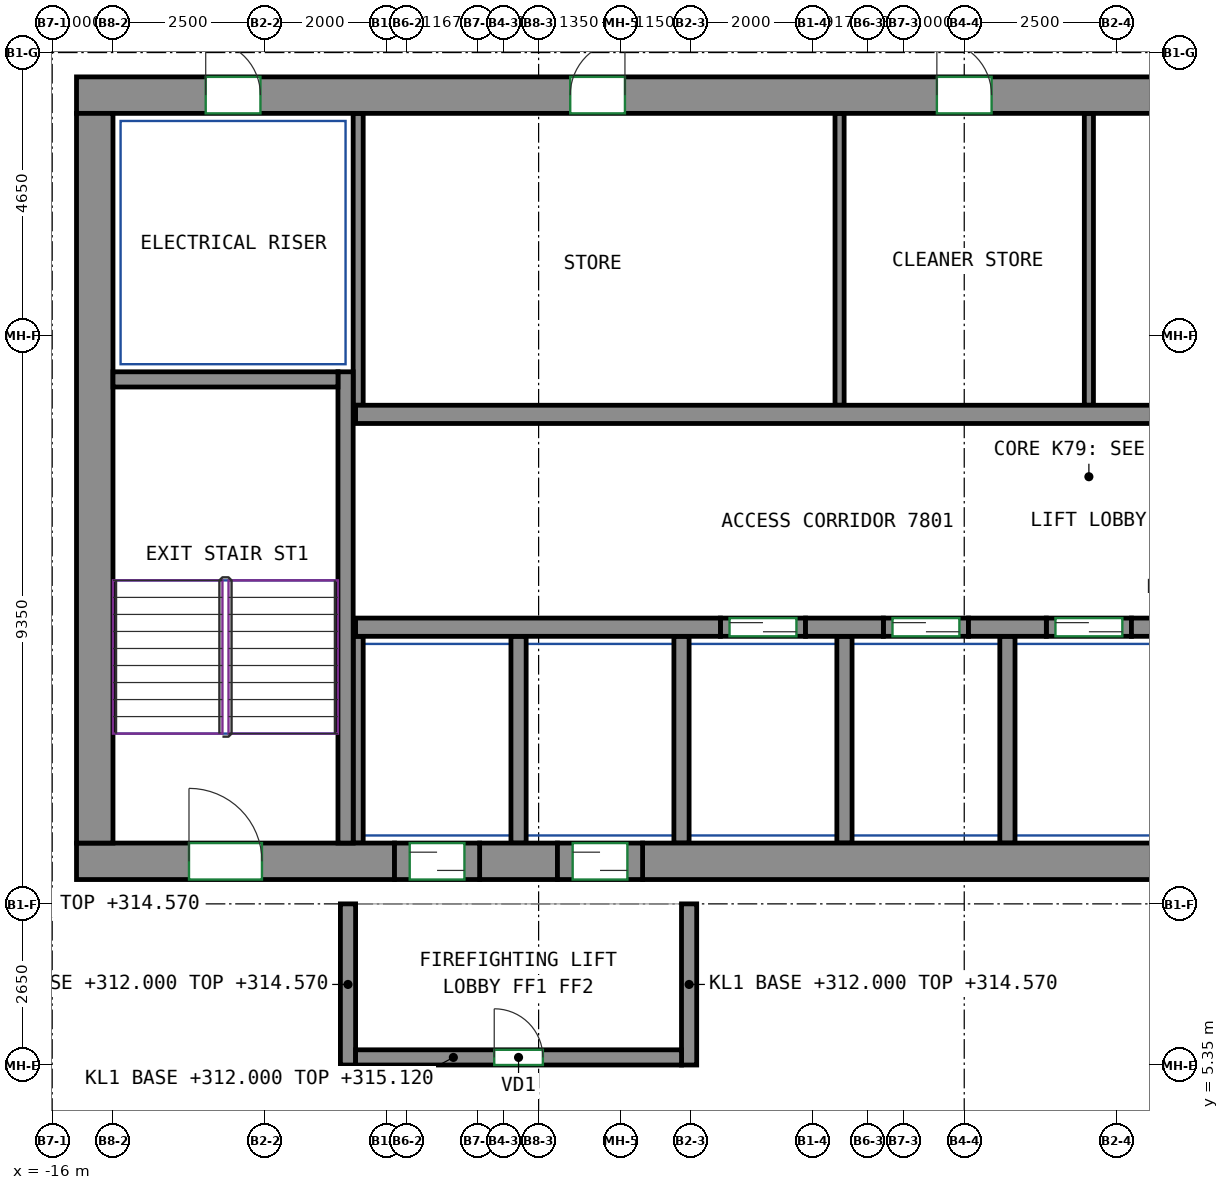
"""IFC4 building model, lengths in metres.
Left out: names, types, materials, properties, quantities, classifications, styles, units other than length and angle.
Written with IfcOpenShell. Run it as: python <this file> out.ifc"""

import sys

from ifc_helpers import new_model, si_unit, direction, frame, frame_2d, origin, place, context, subcontext, project, spatial, rectangle, extrude, source, transform, mapped, element, fill, save


model = new_model("IFC4")
c1 = context("Model", 3, precision=1e-05, world=origin(), true_north=direction((0.0, 1.0)))
c2 = subcontext(c1, "Body", "Model", "MODEL_VIEW")
j1 = project(units=[si_unit("LENGTHUNIT", "METRE"), si_unit("PLANEANGLEUNIT", "RADIAN")], contexts=[c1])
p1 = place(None, origin())
s1 = spatial("IfcSite", under=j1, at=p1, CompositionType="ELEMENT")
p2 = place(p1, origin())
s2 = spatial("IfcBuilding", under=s1, at=p2, CompositionType="ELEMENT")
p3 = place(p2, frame((0.0, 0.0, 312.0)))
s3 = spatial("IfcBuildingStorey", under=s2, at=p3, CompositionType="ELEMENT", Elevation=312.0)
m1 = source(origin(), c2, "Body", "SweptSolid", [
    extrude(rectangle(XDim=5.23, YDim=0.6, at=frame_2d((2.615, 0.0))), origin(), (0.0, 0.0, 1.0), 3.12),
])
p4 = place(p3, frame((-15.6, 8.7, 0.0), z_axis=(0.0, 0.0, 1.0), x_axis=(1.0, 0.0, 0.0)))
e1 = element("IfcWall", 1, at=p4, inside=s3, PredefinedType="SHEAR", context=c2, shape_type="MappedRepresentation", body=[
    mapped(m1, transform((0.0, 0.0, 0.0))),
])
p5 = place(p4, frame((1.85, 0.0, 0.0)))
e2 = element("IfcOpeningElement", 2, at=p5, cuts=e1, PredefinedType="OPENING", context=c2, shape_type="SweptSolid", body=[
    extrude(rectangle(XDim=1.2, YDim=2.1, at=frame_2d((0.6, 1.05))), frame((0.0, 0.31, 0.0), z_axis=(0.0, -1.0, 0.0), x_axis=(1.0, 0.0, 0.0)), (0.0, 0.0, 1.0), 0.62),
])
m2 = source(origin(), c2, "Body", "SweptSolid", [
    extrude(rectangle(XDim=1.28, YDim=0.6, at=frame_2d((0.64, 0.0))), origin(), (0.0, 0.0, 1.0), 3.12),
])
p6 = place(p3, frame((-8.97, 8.7, 0.0), z_axis=(0.0, 0.0, 1.0), x_axis=(1.0, 0.0, 0.0)))
e3 = element("IfcWall", 3, at=p6, inside=s3, PredefinedType="SHEAR", context=c2, shape_type="MappedRepresentation", body=[
    mapped(m2, transform((0.0, 0.0, 0.0))),
])
m3 = source(origin(), c2, "Body", "SweptSolid", [
    extrude(rectangle(XDim=14.18, YDim=0.6, at=frame_2d((7.09, 0.0))), origin(), (0.0, 0.0, 1.0), 3.12),
])
p7 = place(p3, frame((-6.29, 8.7, 0.0), z_axis=(0.0, 0.0, 1.0), x_axis=(1.0, 0.0, 0.0)))
e4 = element("IfcWall", 4, at=p7, inside=s3, PredefinedType="SHEAR", context=c2, shape_type="MappedRepresentation", body=[
    mapped(m3, transform((0.0, 0.0, 0.0))),
])
m4 = source(origin(), c2, "Body", "SweptSolid", [
    extrude(rectangle(XDim=33.3, YDim=0.6, at=frame_2d((16.65, 0.0))), origin(), (0.0, 0.0, 1.0), 3.12),
])
p8 = place(p3, frame((-15.6, 21.3, 0.0), z_axis=(0.0, 0.0, 1.0), x_axis=(1.0, 0.0, 0.0)))
e5 = element("IfcWall", 5, at=p8, inside=s3, PredefinedType="SHEAR", context=c2, shape_type="MappedRepresentation", body=[
    mapped(m4, transform((0.0, 0.0, 0.0))),
])
p9 = place(p8, frame((8.12, 0.0, 0.0)))
e6 = element("IfcOpeningElement", 6, at=p9, cuts=e5, PredefinedType="OPENING", context=c2, shape_type="SweptSolid", body=[
    extrude(rectangle(XDim=0.9, YDim=2.1, at=frame_2d((0.45, 1.05))), frame((0.0, 0.31, 0.0), z_axis=(0.0, -1.0, 0.0), x_axis=(1.0, 0.0, 0.0)), (0.0, 0.0, 1.0), 0.62),
])
p10 = place(p8, frame((14.15, 0.0, 0.0)))
e7 = element("IfcOpeningElement", 7, at=p10, cuts=e5, PredefinedType="OPENING", context=c2, shape_type="SweptSolid", body=[
    extrude(rectangle(XDim=0.9, YDim=2.1, at=frame_2d((0.45, 1.05))), frame((0.0, 0.31, 0.0), z_axis=(0.0, -1.0, 0.0), x_axis=(1.0, 0.0, 0.0)), (0.0, 0.0, 1.0), 0.62),
])
p11 = place(p8, frame((18.974, 0.0, 0.0)))
e8 = element("IfcOpeningElement", 8, at=p11, cuts=e5, PredefinedType="OPENING", context=c2, shape_type="SweptSolid", body=[
    extrude(rectangle(XDim=0.9, YDim=2.1, at=frame_2d((0.45, 1.05))), frame((0.0, 0.31, 0.0), z_axis=(0.0, -1.0, 0.0), x_axis=(1.0, 0.0, 0.0)), (0.0, 0.0, 1.0), 0.62),
])
p12 = place(p8, frame((23.664, 0.0, 0.0)))
e9 = element("IfcOpeningElement", 9, at=p12, cuts=e5, PredefinedType="OPENING", context=c2, shape_type="SweptSolid", body=[
    extrude(rectangle(XDim=0.9, YDim=2.1, at=frame_2d((0.45, 1.05))), frame((0.0, 0.31, 0.0), z_axis=(0.0, -1.0, 0.0), x_axis=(1.0, 0.0, 0.0)), (0.0, 0.0, 1.0), 0.62),
])
p13 = place(p8, frame((26.92, 0.0, 0.0)))
e10 = element("IfcOpeningElement", 10, at=p13, cuts=e5, PredefinedType="OPENING", context=c2, shape_type="SweptSolid", body=[
    extrude(rectangle(XDim=0.9, YDim=2.1, at=frame_2d((0.45, 1.05))), frame((0.0, 0.31, 0.0), z_axis=(0.0, -1.0, 0.0), x_axis=(1.0, 0.0, 0.0)), (0.0, 0.0, 1.0), 0.62),
])
p14 = place(p8, frame((2.125, 0.0, 0.0)))
e11 = element("IfcOpeningElement", 11, at=p14, cuts=e5, PredefinedType="OPENING", context=c2, shape_type="SweptSolid", body=[
    extrude(rectangle(XDim=0.9, YDim=2.1, at=frame_2d((0.45, 1.05))), frame((0.0, 0.31, 0.0), z_axis=(0.0, -1.0, 0.0), x_axis=(1.0, 0.0, 0.0)), (0.0, 0.0, 1.0), 0.62),
])
p15 = place(p8, frame((30.275, 0.0, 0.0)))
e12 = element("IfcOpeningElement", 12, at=p15, cuts=e5, PredefinedType="OPENING", context=c2, shape_type="SweptSolid", body=[
    extrude(rectangle(XDim=0.9, YDim=2.1, at=frame_2d((0.45, 1.05))), frame((0.0, 0.31, 0.0), z_axis=(0.0, -1.0, 0.0), x_axis=(1.0, 0.0, 0.0)), (0.0, 0.0, 1.0), 0.62),
])
m5 = source(origin(), c2, "Body", "SweptSolid", [
    extrude(rectangle(XDim=12.0, YDim=0.6, at=frame_2d((6.0, 0.0))), origin(), (0.0, 0.0, 1.0), 3.12),
])
p16 = place(p3, frame((-15.3, 9.0, 0.0), z_axis=(0.0, 0.0, 1.0), x_axis=(0.0, 1.0, 0.0)))
e13 = element("IfcWall", 13, at=p16, inside=s3, PredefinedType="SHEAR", context=c2, shape_type="MappedRepresentation", body=[
    mapped(m5, transform((0.0, 0.0, 0.0))),
])
m6 = source(origin(), c2, "Body", "SweptSolid", [
    extrude(rectangle(XDim=7.75, YDim=0.25, at=frame_2d((3.875, 0.0))), origin(), (0.0, 0.0, 1.0), 3.12),
])
p17 = place(p3, frame((-11.175, 9.0, 0.0), z_axis=(0.0, 0.0, 1.0), x_axis=(0.0, 1.0, 0.0)))
e14 = element("IfcWall", 14, at=p17, inside=s3, PredefinedType="SHEAR", context=c2, shape_type="MappedRepresentation", body=[
    mapped(m6, transform((0.0, 0.0, 0.0))),
])
m7 = source(origin(), c2, "Body", "SweptSolid", [
    extrude(rectangle(XDim=3.7, YDim=0.25, at=frame_2d((1.85, 0.0))), origin(), (0.0, 0.0, 1.0), 3.12),
])
p18 = place(p3, frame((-15.0, 16.625, 0.0), z_axis=(0.0, 0.0, 1.0), x_axis=(1.0, 0.0, 0.0)))
e15 = element("IfcWall", 15, at=p18, inside=s3, PredefinedType="SHEAR", context=c2, shape_type="MappedRepresentation", body=[
    mapped(m7, transform((0.0, 0.0, 0.0))),
])
m8 = source(origin(), c2, "Body", "SweptSolid", [
    extrude(rectangle(XDim=6.0, YDim=0.3, at=frame_2d((3.0, 0.0))), origin(), (0.0, 0.0, 1.0), 3.12),
])
p19 = place(p3, frame((-11.01, 12.55, 0.0), z_axis=(0.0, 0.0, 1.0), x_axis=(1.0, 0.0, 0.0)))
e16 = element("IfcWall", 16, at=p19, inside=s3, PredefinedType="SHEAR", context=c2, shape_type="MappedRepresentation", body=[
    mapped(m8, transform((0.0, 0.0, 0.0))),
])
m9 = source(origin(), c2, "Body", "SweptSolid", [
    extrude(rectangle(XDim=1.28, YDim=0.3, at=frame_2d((0.64, 0.0))), origin(), (0.0, 0.0, 1.0), 3.12),
])
for number, where, z_axis, x_axis in (
    (17, (-3.61, 12.55, 0.0), (0.0, 0.0, 1.0), (1.0, 0.0, 0.0)),
    (18, (-0.93, 12.55, 0.0), (0.0, 0.0, 1.0), (1.0, 0.0, 0.0)),
    (19, (1.75, 12.55, 0.0), (0.0, 0.0, 1.0), (1.0, 0.0, 0.0)),
):
    element("IfcWall", number, at=place(p3, frame(where, z_axis=z_axis, x_axis=x_axis)), inside=s3, PredefinedType="SHEAR", context=c2, shape_type="MappedRepresentation", body=[
        mapped(m9, transform((0.0, 0.0, 0.0))),
    ])
m10 = source(origin(), c2, "Body", "SweptSolid", [
    extrude(rectangle(XDim=22.08, YDim=0.3, at=frame_2d((11.04, 0.0))), origin(), (0.0, 0.0, 1.0), 3.12),
])
p20 = place(p3, frame((-11.01, 16.05, 0.0), z_axis=(0.0, 0.0, 1.0), x_axis=(1.0, 0.0, 0.0)))
e20 = element("IfcWall", 20, at=p20, inside=s3, PredefinedType="SHEAR", context=c2, shape_type="MappedRepresentation", body=[
    mapped(m10, transform((0.0, 0.0, 0.0))),
])
m11 = source(origin(), c2, "Body", "SweptSolid", [
    extrude(rectangle(XDim=1.4, YDim=0.3, at=frame_2d((0.7, 0.0))), origin(), (0.0, 0.0, 1.0), 3.12),
])
p21 = place(p3, frame((-5.01, 12.55, 0.0), z_axis=(0.0, 0.0, 1.0), x_axis=(1.0, 0.0, 0.0)))
e21 = element("IfcWall", 21, at=p21, inside=s3, PredefinedType="PARTITIONING", context=c2, shape_type="MappedRepresentation", body=[
    mapped(m11, transform((0.0, 0.0, 0.0))),
])
p22 = place(p21, frame((0.15, 0.0, 0.0)))
e22 = element("IfcOpeningElement", 22, at=p22, cuts=e21, PredefinedType="OPENING", context=c2, shape_type="SweptSolid", body=[
    extrude(rectangle(XDim=1.1, YDim=2.1, at=frame_2d((0.55, 1.05))), frame((0.0, 0.16, 0.0), z_axis=(0.0, -1.0, 0.0), x_axis=(1.0, 0.0, 0.0)), (0.0, 0.0, 1.0), 0.32),
])
m12 = source(origin(), c2, "Body", "SweptSolid", [
    extrude(rectangle(XDim=1.4, YDim=0.3, at=frame_2d((0.7, 0.0))), origin(), (0.0, 0.0, 1.0), 3.12),
])
p23 = place(p3, frame((-2.33, 12.55, 0.0), z_axis=(0.0, 0.0, 1.0), x_axis=(1.0, 0.0, 0.0)))
e23 = element("IfcWall", 23, at=p23, inside=s3, PredefinedType="PARTITIONING", context=c2, shape_type="MappedRepresentation", body=[
    mapped(m12, transform((0.0, 0.0, 0.0))),
])
p24 = place(p23, frame((0.15, 0.0, 0.0)))
e24 = element("IfcOpeningElement", 24, at=p24, cuts=e23, PredefinedType="OPENING", context=c2, shape_type="SweptSolid", body=[
    extrude(rectangle(XDim=1.1, YDim=2.1, at=frame_2d((0.55, 1.05))), frame((0.0, 0.16, 0.0), z_axis=(0.0, -1.0, 0.0), x_axis=(1.0, 0.0, 0.0)), (0.0, 0.0, 1.0), 0.32),
])
p25 = place(p3, frame((0.35, 12.55, 0.0), z_axis=(0.0, 0.0, 1.0), x_axis=(1.0, 0.0, 0.0)))
e25 = element("IfcWall", 25, at=p25, inside=s3, PredefinedType="PARTITIONING", context=c2, shape_type="MappedRepresentation", body=[
    mapped(m11, transform((0.0, 0.0, 0.0))),
])
p26 = place(p25, frame((0.15, 0.0, 0.0)))
e26 = element("IfcOpeningElement", 26, at=p26, cuts=e25, PredefinedType="OPENING", context=c2, shape_type="SweptSolid", body=[
    extrude(rectangle(XDim=1.1, YDim=2.1, at=frame_2d((0.55, 1.05))), frame((0.0, 0.16, 0.0), z_axis=(0.0, -1.0, 0.0), x_axis=(1.0, 0.0, 0.0)), (0.0, 0.0, 1.0), 0.32),
])
m13 = source(origin(), c2, "Body", "SweptSolid", [
    extrude(rectangle(XDim=2.65, YDim=0.25, at=frame_2d((1.325, 0.0))), origin(), (0.0, 0.0, 1.0), 2.57),
])
for number, where, z_axis, x_axis in (
    (27, (-11.135, 5.35, 0.0), (0.0, 0.0, 1.0), (0.0, 1.0, 0.0)),
    (28, (-5.525, 5.35, 0.0), (0.0, 0.0, 1.0), (0.0, 1.0, 0.0)),
):
    element("IfcWall", number, at=place(p3, frame(where, z_axis=z_axis, x_axis=x_axis)), inside=s3, PredefinedType="PARTITIONING", context=c2, shape_type="MappedRepresentation", body=[
        mapped(m13, transform((0.0, 0.0, 0.0))),
    ])
m14 = source(origin(), c2, "Body", "SweptSolid", [
    extrude(rectangle(XDim=5.36, YDim=0.25, at=frame_2d((2.68, 0.0))), origin(), (0.0, 0.0, 1.0), 3.12),
])
p27 = place(p3, frame((-11.01, 5.475, 0.0), z_axis=(0.0, 0.0, 1.0), x_axis=(1.0, 0.0, 0.0)))
e29 = element("IfcWall", 29, at=p27, inside=s3, PredefinedType="PARTITIONING", context=c2, shape_type="MappedRepresentation", body=[
    mapped(m14, transform((0.0, 0.0, 0.0))),
])
p28 = place(p27, frame((2.28, 0.0, 0.0)))
e30 = element("IfcOpeningElement", 30, at=p28, cuts=e29, PredefinedType="OPENING", context=c2, shape_type="SweptSolid", body=[
    extrude(rectangle(XDim=0.8, YDim=2.0, at=frame_2d((0.4, 1.0))), frame((0.0, 0.135, 0.0), z_axis=(0.0, -1.0, 0.0), x_axis=(1.0, 0.0, 0.0)), (0.0, 0.0, 1.0), 0.27),
])
m15 = source(origin(), c2, "Body", "SweptSolid", [
    extrude(rectangle(XDim=4.8, YDim=0.165, at=frame_2d((2.4, 0.0))), origin(), (0.0, 0.0, 1.0), 3.12),
])
p29 = place(p3, frame((-10.968, 16.2, 0.0), z_axis=(0.0, 0.0, 1.0), x_axis=(0.0, 1.0, 0.0)))
e31 = element("IfcWall", 31, at=p29, inside=s3, PredefinedType="PARTITIONING", context=c2, shape_type="MappedRepresentation", body=[
    mapped(m15, transform((0.0, 0.0, 0.0))),
])
m16 = source(origin(), c2, "Body", "SweptSolid", [
    extrude(rectangle(XDim=3.4, YDim=0.25, at=frame_2d((1.7, 0.0))), origin(), (0.0, 0.0, 1.0), 3.12),
])
p30 = place(p3, frame((-0.29, 9.0, 0.0), z_axis=(0.0, 0.0, 1.0), x_axis=(0.0, 1.0, 0.0)))
e32 = element("IfcWall", 32, at=p30, inside=s3, PredefinedType="PARTITIONING", context=c2, shape_type="MappedRepresentation", body=[
    mapped(m16, transform((0.0, 0.0, 0.0))),
])
m17 = source(origin(), c2, "Body", "SweptSolid", [
    extrude(rectangle(XDim=3.4, YDim=0.165, at=frame_2d((1.7, 0.0))), origin(), (0.0, 0.0, 1.0), 3.12),
])
p31 = place(p3, frame((-10.968, 9.0, 0.0), z_axis=(0.0, 0.0, 1.0), x_axis=(0.0, 1.0, 0.0)))
e33 = element("IfcWall", 33, at=p31, inside=s3, PredefinedType="PARTITIONING", context=c2, shape_type="MappedRepresentation", body=[
    mapped(m17, transform((0.0, 0.0, 0.0))),
])
for number, where, z_axis, x_axis in (
    (34, (-2.97, 9.0, 0.0), (0.0, 0.0, 1.0), (0.0, 1.0, 0.0)),
    (35, (-5.65, 9.0, 0.0), (0.0, 0.0, 1.0), (0.0, 1.0, 0.0)),
    (36, (-8.33, 9.0, 0.0), (0.0, 0.0, 1.0), (0.0, 1.0, 0.0)),
):
    element("IfcWall", number, at=place(p3, frame(where, z_axis=z_axis, x_axis=x_axis)), inside=s3, PredefinedType="PARTITIONING", context=c2, shape_type="MappedRepresentation", body=[
        mapped(m16, transform((0.0, 0.0, 0.0))),
    ])
m18 = source(origin(), c2, "Body", "SweptSolid", [
    extrude(rectangle(XDim=4.8, YDim=0.15, at=frame_2d((2.4, 0.0))), origin(), (0.0, 0.0, 1.0), 3.12),
])
for number, where, z_axis, x_axis in (
    (37, (-3.05, 16.2, 0.0), (0.0, 0.0, 1.0), (0.0, 1.0, 0.0)),
    (38, (1.05, 16.2, 0.0), (0.0, 0.0, 1.0), (0.0, 1.0, 0.0)),
):
    element("IfcWall", number, at=place(p3, frame(where, z_axis=z_axis, x_axis=x_axis)), inside=s3, PredefinedType="PARTITIONING", context=c2, shape_type="MappedRepresentation", body=[
        mapped(m18, transform((0.0, 0.0, 0.0))),
    ])
m19 = source(origin(), c2, "Body", "SweptSolid", [
    extrude(rectangle(XDim=1.4, YDim=0.6, at=frame_2d((0.7, 0.0))), origin(), (0.0, 0.0, 1.0), 2.7),
])
p32 = place(p3, frame((-10.37, 8.7, 0.0), z_axis=(0.0, 0.0, 1.0), x_axis=(1.0, 0.0, 0.0)))
e39 = element("IfcWall", 39, at=p32, inside=s3, PredefinedType="PARTITIONING", context=c2, shape_type="MappedRepresentation", body=[
    mapped(m19, transform((0.0, 0.0, 0.0))),
])
p33 = place(p32, frame((0.25, 0.0, 0.0)))
e40 = element("IfcOpeningElement", 40, at=p33, cuts=e39, PredefinedType="OPENING", context=c2, shape_type="SweptSolid", body=[
    extrude(rectangle(XDim=0.9, YDim=2.1, at=frame_2d((0.45, 1.05))), frame((0.0, 0.31, 0.0), z_axis=(0.0, -1.0, 0.0), x_axis=(1.0, 0.0, 0.0)), (0.0, 0.0, 1.0), 0.62),
])
m20 = source(origin(), c2, "Body", "SweptSolid", [
    extrude(rectangle(XDim=1.4, YDim=0.6, at=frame_2d((0.7, 0.0))), origin(), (0.0, 0.0, 1.0), 2.7),
])
p34 = place(p3, frame((-7.69, 8.7, 0.0), z_axis=(0.0, 0.0, 1.0), x_axis=(1.0, 0.0, 0.0)))
e41 = element("IfcWall", 41, at=p34, inside=s3, PredefinedType="PARTITIONING", context=c2, shape_type="MappedRepresentation", body=[
    mapped(m20, transform((0.0, 0.0, 0.0))),
])
p35 = place(p34, frame((0.25, 0.0, 0.0)))
e42 = element("IfcOpeningElement", 42, at=p35, cuts=e41, PredefinedType="OPENING", context=c2, shape_type="SweptSolid", body=[
    extrude(rectangle(XDim=0.9, YDim=2.1, at=frame_2d((0.45, 1.05))), frame((0.0, 0.31, 0.0), z_axis=(0.0, -1.0, 0.0), x_axis=(1.0, 0.0, 0.0)), (0.0, 0.0, 1.0), 0.62),
])
p36 = place(p28, origin())
e43 = element("IfcDoor", 43, at=p36, inside=s3, OperationType="SINGLE_SWING_LEFT", PredefinedType="DOOR", context=c2, shape_type="SweptSolid", body=[
    extrude(rectangle(XDim=0.8, YDim=2.0, at=frame_2d((0.4, 1.0))), frame((0.0, 0.025, 0.0), z_axis=(0.0, -1.0, 0.0), x_axis=(1.0, 0.0, 0.0)), (0.0, 0.0, 1.0), 0.05),
])
fill(e30, e43)
p37 = place(p33, origin())
e44 = element("IfcDoor", 44, at=p37, inside=s3, OperationType="SLIDING_TO_LEFT", PredefinedType="DOOR", context=c2, shape_type="SweptSolid", body=[
    extrude(rectangle(XDim=0.9, YDim=2.1, at=frame_2d((0.45, 1.05))), frame((0.0, 0.205, 0.0), z_axis=(0.0, -1.0, 0.0), x_axis=(1.0, 0.0, 0.0)), (0.0, 0.0, 1.0), 0.05),
])
fill(e40, e44)
p38 = place(p35, origin())
e45 = element("IfcDoor", 45, at=p38, inside=s3, OperationType="SLIDING_TO_RIGHT", PredefinedType="DOOR", context=c2, shape_type="SweptSolid", body=[
    extrude(rectangle(XDim=0.9, YDim=2.1, at=frame_2d((0.45, 1.05))), frame((0.0, 0.205, 0.0), z_axis=(0.0, -1.0, 0.0), x_axis=(1.0, 0.0, 0.0)), (0.0, 0.0, 1.0), 0.05),
])
fill(e42, e45)
p39 = place(p22, origin())
e46 = element("IfcDoor", 46, at=p39, inside=s3, OperationType="DOUBLE_DOOR_SLIDING", PredefinedType="DOOR", context=c2, shape_type="SweptSolid", body=[
    extrude(rectangle(XDim=1.1, YDim=2.1, at=frame_2d((0.55, 1.05))), frame((0.0, 0.025, 0.0), z_axis=(0.0, -1.0, 0.0), x_axis=(1.0, 0.0, 0.0)), (0.0, 0.0, 1.0), 0.05),
])
fill(e22, e46)
p40 = place(p24, origin())
e47 = element("IfcDoor", 47, at=p40, inside=s3, OperationType="DOUBLE_DOOR_SLIDING", PredefinedType="DOOR", context=c2, shape_type="SweptSolid", body=[
    extrude(rectangle(XDim=1.1, YDim=2.1, at=frame_2d((0.55, 1.05))), frame((0.0, 0.025, 0.0), z_axis=(0.0, -1.0, 0.0), x_axis=(1.0, 0.0, 0.0)), (0.0, 0.0, 1.0), 0.05),
])
fill(e24, e47)
p41 = place(p26, origin())
e48 = element("IfcDoor", 48, at=p41, inside=s3, OperationType="DOUBLE_DOOR_SLIDING", PredefinedType="DOOR", context=c2, shape_type="SweptSolid", body=[
    extrude(rectangle(XDim=1.1, YDim=2.1, at=frame_2d((0.55, 1.05))), frame((0.0, 0.025, 0.0), z_axis=(0.0, -1.0, 0.0), x_axis=(1.0, 0.0, 0.0)), (0.0, 0.0, 1.0), 0.05),
])
fill(e26, e48)
p42 = place(p9, origin())
e49 = element("IfcDoor", 49, at=p42, inside=s3, OperationType="SINGLE_SWING_RIGHT", PredefinedType="DOOR", context=c2, shape_type="SweptSolid", body=[
    extrude(rectangle(XDim=0.9, YDim=2.1, at=frame_2d((0.45, 1.05))), frame((0.0, -0.155, 0.0), z_axis=(0.0, -1.0, 0.0), x_axis=(1.0, 0.0, 0.0)), (0.0, 0.0, 1.0), 0.05),
])
fill(e6, e49)
p43 = place(p10, origin())
e50 = element("IfcDoor", 50, at=p43, inside=s3, OperationType="SINGLE_SWING_LEFT", PredefinedType="DOOR", context=c2, shape_type="SweptSolid", body=[
    extrude(rectangle(XDim=0.9, YDim=2.1, at=frame_2d((0.45, 1.05))), frame((0.0, -0.155, 0.0), z_axis=(0.0, -1.0, 0.0), x_axis=(1.0, 0.0, 0.0)), (0.0, 0.0, 1.0), 0.05),
])
fill(e7, e50)
p44 = place(p14, origin())
e51 = element("IfcDoor", 51, at=p44, inside=s3, OperationType="SINGLE_SWING_LEFT", PredefinedType="DOOR", context=c2, shape_type="SweptSolid", body=[
    extrude(rectangle(XDim=0.9, YDim=2.1, at=frame_2d((0.45, 1.05))), frame((0.0, -0.155, 0.0), z_axis=(0.0, -1.0, 0.0), x_axis=(1.0, 0.0, 0.0)), (0.0, 0.0, 1.0), 0.05),
])
fill(e11, e51)
p45 = place(p5, origin())
e52 = element("IfcDoor", 52, at=p45, inside=s3, OperationType="DOUBLE_DOOR_SINGLE_SWING", PredefinedType="DOOR", context=c2, shape_type="SweptSolid", body=[
    extrude(rectangle(XDim=1.2, YDim=2.1, at=frame_2d((0.6, 1.05))), frame((0.0, 0.205, 0.0), z_axis=(0.0, -1.0, 0.0), x_axis=(1.0, 0.0, 0.0)), (0.0, 0.0, 1.0), 0.05),
])
fill(e2, e52)
save(model, sys.argv[1])
